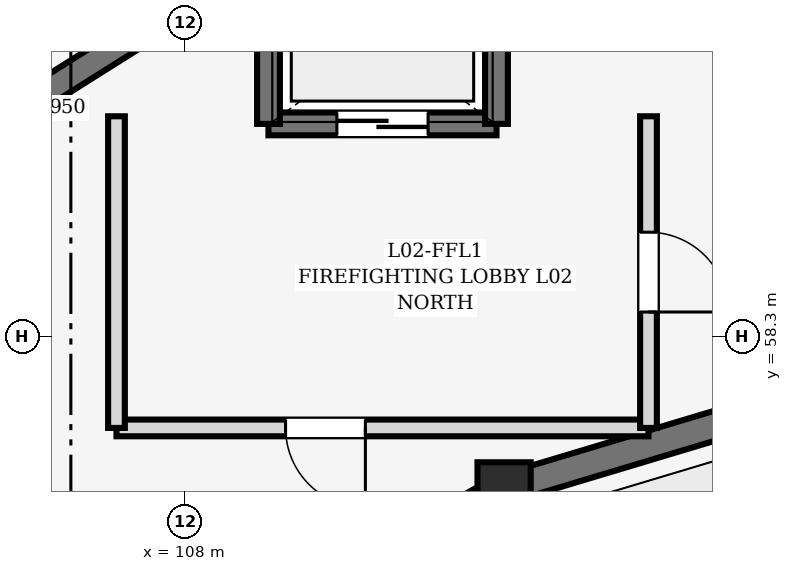
"""IFC4 building model, lengths in metres.
Left out: names, types, materials, properties, quantities, classifications, styles, units other than length and angle.
Written with IfcOpenShell. Run it as: python <this file> out.ifc"""

import sys

from ifc_helpers import new_model, si_unit, direction, frame, frame_2d, origin, origin_2d, place, context, subcontext, project, spatial, rectangle, extrude, element, fill, save


model = new_model("IFC4")
c1 = context("Model", 3, precision=1e-05, world=origin(), true_north=direction((0.0, 1.0)))
c2 = subcontext(c1, "Body", "Model", "MODEL_VIEW")
j1 = project(units=[si_unit("LENGTHUNIT", "METRE"), si_unit("PLANEANGLEUNIT", "RADIAN")], contexts=[c1])
p1 = place(None, origin())
s1 = spatial("IfcSite", under=j1, at=p1, CompositionType="ELEMENT")
p2 = place(p1, origin())
s2 = spatial("IfcBuilding", under=s1, at=p2, CompositionType="ELEMENT")
p3 = place(p2, frame((0.0, 0.0, 5.4)))
s3 = spatial("IfcBuildingStorey", under=s2, at=p3, CompositionType="ELEMENT", Elevation=5.4)
p4 = place(p3, frame((112.2, 56.298, 0.0), z_axis=(0.0, 0.0, 1.0), x_axis=(1.0, 0.0, 0.0)))
e1 = element("IfcColumn", 1, at=p4, inside=s3, PredefinedType="COLUMN", context=c2, shape_type="SweptSolid", body=[
    extrude(rectangle(XDim=0.7, YDim=0.7, at=origin_2d()), origin(), (0.0, 0.0, 1.0), 4.8),
])
p5 = place(p3, frame((116.654, 57.634, 0.0), z_axis=(0.0, 0.0, 1.0), x_axis=(-0.957792414988, -0.287460762177, 0.0)))
e2 = element("IfcWall", 2, at=p5, inside=s3, PredefinedType="SOLIDWALL", context=c2, shape_type="SweptSolid", body=[
    extrude(rectangle(XDim=4.365, YDim=0.38, at=frame_2d((2.183, 0.0))), origin(), (0.0, 0.0, 1.0), 4.52),
])
p6 = place(p3, frame((111.951, 56.159, 0.0), z_axis=(0.0, 0.0, 1.0), x_axis=(-0.87401308715, -0.485902380618, 0.0)))
e3 = element("IfcWall", 3, at=p6, inside=s3, PredefinedType="SOLIDWALL", context=c2, shape_type="SweptSolid", body=[
    extrude(rectangle(XDim=4.074, YDim=0.38, at=frame_2d((2.037, 0.0))), origin(), (0.0, 0.0, 1.0), 4.52),
])
p7 = place(p3, frame((108.346, 62.893, 0.0), z_axis=(0.0, 0.0, 1.0), x_axis=(-0.846132783073, -0.532972150688, 0.0)))
e4 = element("IfcWall", 4, at=p7, inside=s3, PredefinedType="SHEAR", context=c2, shape_type="SweptSolid", body=[
    extrude(rectangle(XDim=5.95, YDim=0.35, at=frame_2d((2.975, 0.0))), origin(), (0.0, 0.0, 1.0), 4.52),
])
p8 = place(p3, frame((112.1, 61.1, 0.0), z_axis=(0.0, 0.0, 1.0), x_axis=(-1.0, 0.0, 0.0)))
e5 = element("IfcWall", 5, at=p8, inside=s3, PredefinedType="SHEAR", context=c2, shape_type="SweptSolid", body=[
    extrude(rectangle(XDim=3.0, YDim=0.3, at=frame_2d((1.5, 0.0))), origin(), (0.0, 0.0, 1.0), 4.55),
])
p9 = place(p8, frame((0.9, 0.0, 0.0)))
e6 = element("IfcOpeningElement", 6, at=p9, cuts=e5, PredefinedType="OPENING", context=c2, shape_type="SweptSolid", body=[
    extrude(rectangle(XDim=1.2, YDim=2.15, at=frame_2d((0.6, 1.075))), frame((0.0, 0.162, 0.0), z_axis=(0.0, -1.0, 0.0), x_axis=(1.0, 0.0, 0.0)), (0.0, 0.0, 1.0), 0.324),
])
p10 = place(p3, frame((112.1, 63.3, 0.0), z_axis=(0.0, 0.0, 1.0), x_axis=(0.0, -1.0, 0.0)))
e7 = element("IfcWall", 7, at=p10, inside=s3, PredefinedType="SHEAR", context=c2, shape_type="SweptSolid", body=[
    extrude(rectangle(XDim=2.2, YDim=0.3, at=frame_2d((1.1, 0.0))), origin(), (0.0, 0.0, 1.0), 4.55),
])
p11 = place(p3, frame((109.1, 61.1, 0.0), z_axis=(0.0, 0.0, 1.0), x_axis=(0.0, 1.0, 0.0)))
e8 = element("IfcWall", 8, at=p11, inside=s3, PredefinedType="SHEAR", context=c2, shape_type="SweptSolid", body=[
    extrude(rectangle(XDim=2.2, YDim=0.3, at=frame_2d((1.1, 0.0))), origin(), (0.0, 0.0, 1.0), 4.52),
])
p12 = place(p3, frame((114.1, 57.1, 0.0), z_axis=(0.0, 0.0, 1.0), x_axis=(-1.0, 0.0, 0.0)))
e9 = element("IfcWall", 9, at=p12, inside=s3, PredefinedType="SOLIDWALL", context=c2, shape_type="SweptSolid", body=[
    extrude(rectangle(XDim=7.0, YDim=0.22, at=frame_2d((3.5, 0.0))), origin(), (0.0, 0.0, 1.0), 4.535),
])
p13 = place(p12, frame((3.725, 0.0, 0.0)))
e10 = element("IfcOpeningElement", 10, at=p13, cuts=e9, PredefinedType="OPENING", context=c2, shape_type="SweptSolid", body=[
    extrude(rectangle(XDim=1.05, YDim=2.15, at=frame_2d((0.525, 1.075))), frame((0.0, 0.122, 0.0), z_axis=(0.0, -1.0, 0.0), x_axis=(1.0, 0.0, 0.0)), (0.0, 0.0, 1.0), 0.244),
])
p14 = place(p3, frame((107.1, 57.1, 0.0), z_axis=(0.0, 0.0, 1.0), x_axis=(0.0, 1.0, 0.0)))
e11 = element("IfcWall", 11, at=p14, inside=s3, PredefinedType="SOLIDWALL", context=c2, shape_type="SweptSolid", body=[
    extrude(rectangle(XDim=4.1, YDim=0.22, at=frame_2d((2.05, 0.0))), origin(), (0.0, 0.0, 1.0), 4.535),
])
p15 = place(p3, frame((114.1, 61.2, 0.0), z_axis=(0.0, 0.0, 1.0), x_axis=(0.0, -1.0, 0.0)))
e12 = element("IfcWall", 12, at=p15, inside=s3, PredefinedType="SOLIDWALL", context=c2, shape_type="SweptSolid", body=[
    extrude(rectangle(XDim=4.1, YDim=0.22, at=frame_2d((2.05, 0.0))), origin(), (0.0, 0.0, 1.0), 4.535),
])
p16 = place(p15, frame((1.525, 0.0, 0.0)))
e13 = element("IfcOpeningElement", 13, at=p16, cuts=e12, PredefinedType="OPENING", context=c2, shape_type="SweptSolid", body=[
    extrude(rectangle(XDim=1.05, YDim=2.15, at=frame_2d((0.525, 1.075))), frame((0.0, 0.122, 0.0), z_axis=(0.0, -1.0, 0.0), x_axis=(1.0, 0.0, 0.0)), (0.0, 0.0, 1.0), 0.244),
])
p17 = place(p9, origin())
e14 = element("IfcDoor", 14, at=p17, inside=s3, OperationType="DOUBLE_DOOR_SLIDING", PredefinedType="DOOR", context=c2, shape_type="SweptSolid", body=[
    extrude(rectangle(XDim=1.2, YDim=2.15, at=frame_2d((0.6, 1.075))), frame((0.0, 0.025, 0.0), z_axis=(0.0, -1.0, 0.0), x_axis=(1.0, 0.0, 0.0)), (0.0, 0.0, 1.0), 0.05),
])
fill(e6, e14)
p18 = place(p13, origin())
e15 = element("IfcDoor", 15, at=p18, inside=s3, OperationType="SINGLE_SWING_LEFT", PredefinedType="DOOR", context=c2, shape_type="SweptSolid", body=[
    extrude(rectangle(XDim=1.05, YDim=2.15, at=frame_2d((0.525, 1.075))), frame((0.0, 0.025, 0.0), z_axis=(0.0, -1.0, 0.0), x_axis=(1.0, 0.0, 0.0)), (0.0, 0.0, 1.0), 0.05),
])
fill(e10, e15)
p19 = place(p16, origin())
e16 = element("IfcDoor", 16, at=p19, inside=s3, OperationType="SINGLE_SWING_RIGHT", PredefinedType="DOOR", context=c2, shape_type="SweptSolid", body=[
    extrude(rectangle(XDim=1.05, YDim=2.15, at=frame_2d((0.525, 1.075))), frame((0.0, 0.025, 0.0), z_axis=(0.0, -1.0, 0.0), x_axis=(1.0, 0.0, 0.0)), (0.0, 0.0, 1.0), 0.05),
])
fill(e13, e16)
save(model, sys.argv[1])
